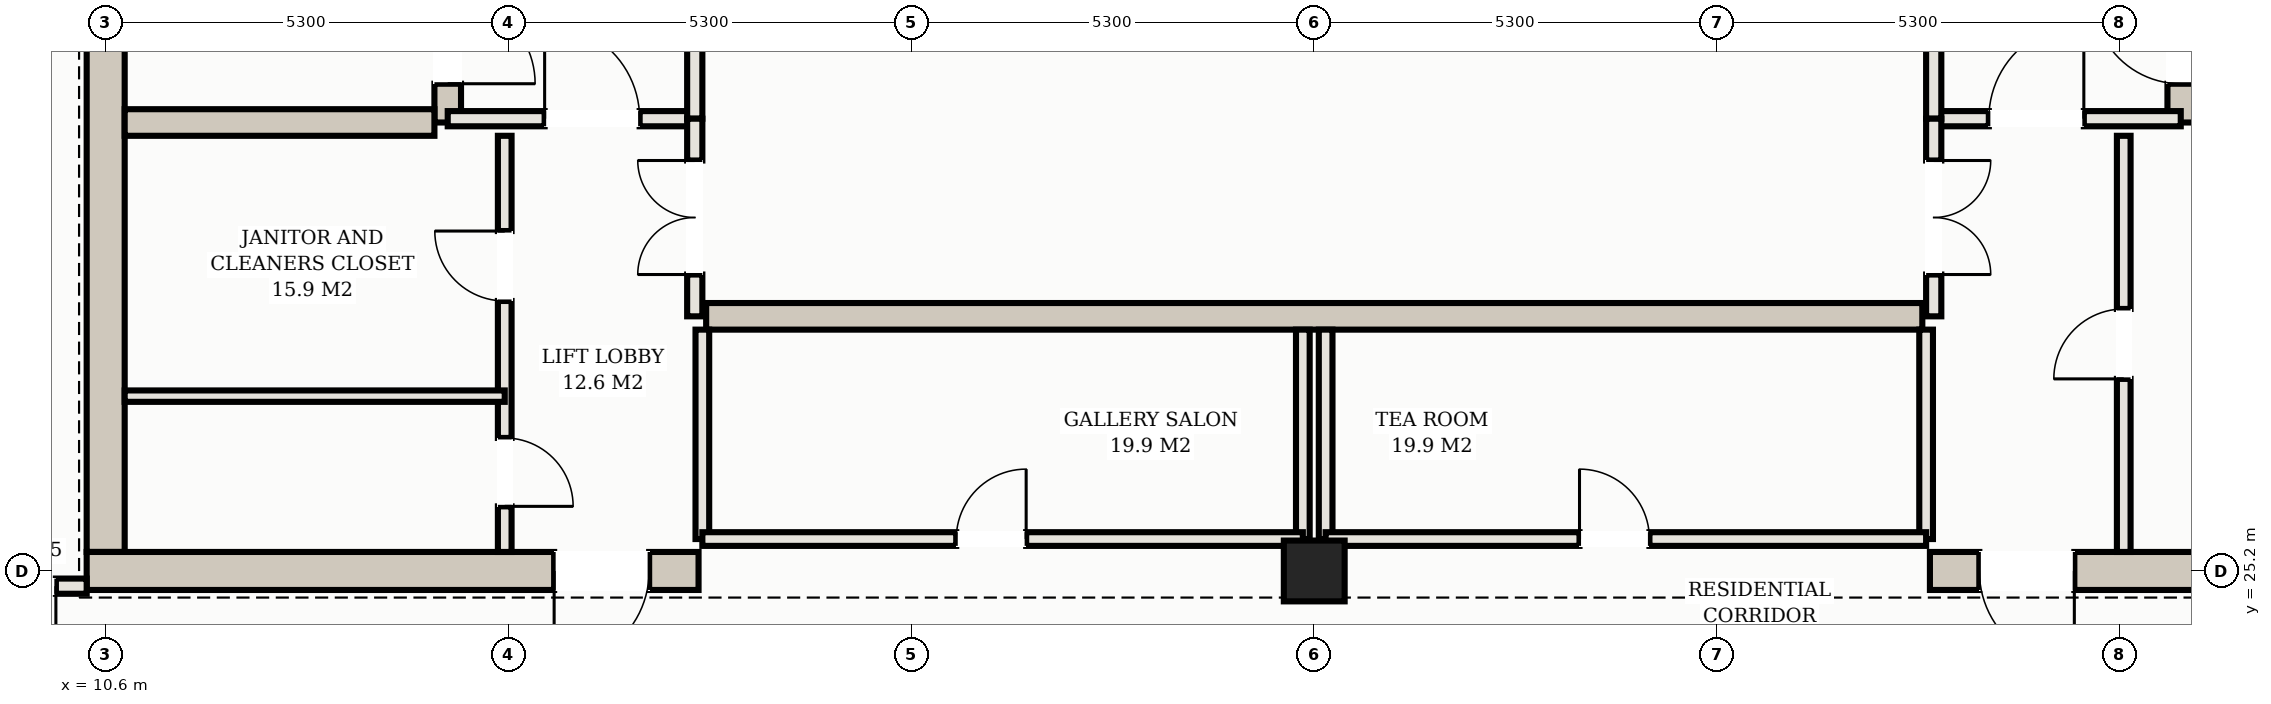
"""IFC4 building model, lengths in metres.
Left out: names, types, materials, properties, quantities, classifications, styles, units other than length and angle.
Written with IfcOpenShell. Run it as: python <this file> out.ifc"""

import sys

from ifc_helpers import new_model, si_unit, direction, frame, frame_2d, origin, origin_2d, place, context, subcontext, project, spatial, rectangle, hollow_rectangle, extrude, element, fill, save


model = new_model("IFC4")
c1 = context("Model", 3, precision=1e-05, world=origin(), true_north=direction((0.0, 1.0)))
c2 = subcontext(c1, "Body", "Model", "MODEL_VIEW")
j1 = project(units=[si_unit("LENGTHUNIT", "METRE"), si_unit("PLANEANGLEUNIT", "RADIAN")], contexts=[c1])
p1 = place(None, origin())
s1 = spatial("IfcSite", under=j1, at=p1, CompositionType="ELEMENT")
p2 = place(p1, origin())
s2 = spatial("IfcBuilding", under=s1, at=p2, CompositionType="ELEMENT")
p3 = place(p2, frame((0.0, 0.0, 213.2)))
s3 = spatial("IfcBuildingStorey", under=s2, at=p3, CompositionType="ELEMENT", Elevation=213.2)
p4 = place(p3, frame((10.6, 25.45, 0.0), z_axis=(0.0, 0.0, 1.0), x_axis=(0.0, 1.0, 0.0)))
e1 = element("IfcWall", 1, at=p4, inside=s3, PredefinedType="SHEAR", context=c2, shape_type="SweptSolid", body=[
    extrude(rectangle(XDim=14.3, YDim=0.5, at=frame_2d((7.15, 0.0))), origin(), (0.0, 0.0, 1.0), 3.11),
])
p5 = place(p3, frame((10.35, 25.2, 0.0), z_axis=(0.0, 0.0, 1.0), x_axis=(1.0, 0.0, 0.0)))
e2 = element("IfcWall", 2, at=p5, inside=s3, PredefinedType="SHEAR", context=c2, shape_type="SweptSolid", body=[
    extrude(rectangle(XDim=8.05, YDim=0.5, at=frame_2d((4.025, 0.0))), origin(), (0.0, 0.0, 1.0), 3.11),
])
p6 = place(p5, frame((6.15, 0.0, 0.0)))
e3 = element("IfcOpeningElement", 3, at=p6, cuts=e2, PredefinedType="OPENING", context=c2, shape_type="SweptSolid", body=[
    extrude(rectangle(XDim=1.25, YDim=2.2, at=frame_2d((0.625, 1.1))), frame((0.0, 0.26, 0.0), z_axis=(0.0, -1.0, 0.0), x_axis=(1.0, 0.0, 0.0)), (0.0, 0.0, 1.0), 0.52),
])
p7 = place(p3, frame((34.6, 25.2, 0.0), z_axis=(0.0, 0.0, 1.0), x_axis=(1.0, 0.0, 0.0)))
e4 = element("IfcWall", 4, at=p7, inside=s3, PredefinedType="SHEAR", context=c2, shape_type="SweptSolid", body=[
    extrude(rectangle(XDim=8.05, YDim=0.5, at=frame_2d((4.025, 0.0))), origin(), (0.0, 0.0, 1.0), 3.11),
])
p8 = place(p7, frame((0.65, 0.0, 0.0)))
e5 = element("IfcOpeningElement", 5, at=p8, cuts=e4, PredefinedType="OPENING", context=c2, shape_type="SweptSolid", body=[
    extrude(rectangle(XDim=1.25, YDim=2.2, at=frame_2d((0.625, 1.1))), frame((0.0, 0.26, 0.0), z_axis=(0.0, -1.0, 0.0), x_axis=(1.0, 0.0, 0.0)), (0.0, 0.0, 1.0), 0.52),
])
p9 = place(p3, frame((15.1, 31.1, 0.0), z_axis=(0.0, 0.0, 1.0), x_axis=(0.0, 1.0, 0.0)))
e6 = element("IfcWall", 6, at=p9, inside=s3, PredefinedType="SHEAR", context=c2, shape_type="SweptSolid", body=[
    extrude(rectangle(XDim=8.65, YDim=0.35, at=frame_2d((4.325, 0.0))), origin(), (0.0, 0.0, 1.0), 3.11),
])
p10 = place(p9, frame((0.51, 0.0, 0.0)))
e7 = element("IfcOpeningElement", 7, at=p10, cuts=e6, PredefinedType="OPENING", context=c2, shape_type="SweptSolid", body=[
    extrude(rectangle(XDim=1.15, YDim=2.2, at=frame_2d((0.575, 1.1))), frame((0.0, 0.185, 0.0), z_axis=(0.0, -1.0, 0.0), x_axis=(1.0, 0.0, 0.0)), (0.0, 0.0, 1.0), 0.37),
])
p11 = place(p3, frame((10.85, 31.1, 0.0), z_axis=(0.0, 0.0, 1.0), x_axis=(1.0, 0.0, 0.0)))
e8 = element("IfcWall", 8, at=p11, inside=s3, PredefinedType="SHEAR", context=c2, shape_type="SweptSolid", body=[
    extrude(rectangle(XDim=4.075, YDim=0.35, at=frame_2d((2.038, 0.0))), origin(), (0.0, 0.0, 1.0), 3.11),
])
p12 = place(p3, frame((37.9, 31.1, 0.0), z_axis=(0.0, 0.0, 1.0), x_axis=(0.0, 1.0, 0.0)))
e9 = element("IfcWall", 9, at=p12, inside=s3, PredefinedType="SHEAR", context=c2, shape_type="SweptSolid", body=[
    extrude(rectangle(XDim=8.65, YDim=0.35, at=frame_2d((4.325, 0.0))), origin(), (0.0, 0.0, 1.0), 3.11),
])
p13 = place(p12, frame((0.51, 0.0, 0.0)))
e10 = element("IfcOpeningElement", 10, at=p13, cuts=e9, PredefinedType="OPENING", context=c2, shape_type="SweptSolid", body=[
    extrude(rectangle(XDim=1.15, YDim=2.2, at=frame_2d((0.575, 1.1))), frame((0.0, 0.185, 0.0), z_axis=(0.0, -1.0, 0.0), x_axis=(1.0, 0.0, 0.0)), (0.0, 0.0, 1.0), 0.37),
])
p14 = place(p3, frame((18.5, 28.55, 0.0), z_axis=(0.0, 0.0, 1.0), x_axis=(1.0, 0.0, 0.0)))
e11 = element("IfcWall", 11, at=p14, inside=s3, PredefinedType="SHEAR", context=c2, shape_type="SweptSolid", body=[
    extrude(rectangle(XDim=16.0, YDim=0.35, at=frame_2d((8.0, 0.0))), origin(), (0.0, 0.0, 1.0), 3.11),
])
p15 = place(p3, frame((26.5, 25.2, 0.0), z_axis=(0.0, 0.0, 1.0), x_axis=(1.0, 0.0, 0.0)))
e12 = element("IfcColumn", 12, at=p15, inside=s3, PredefinedType="COLUMN", context=c2, shape_type="SweptSolid", body=[
    extrude(hollow_rectangle(XDim=0.8, YDim=0.8, WallThickness=0.028, at=origin_2d()), origin(), (0.0, 0.0, 1.0), 3.3),
])
p16 = place(p3, frame((15.1, 31.15, 0.0), z_axis=(0.0, 0.0, 1.0), x_axis=(1.0, 0.0, 0.0)))
e13 = element("IfcWall", 13, at=p16, inside=s3, PredefinedType="PARTITIONING", context=c2, shape_type="SweptSolid", body=[
    extrude(rectangle(XDim=3.25, YDim=0.2, at=frame_2d((1.625, 0.0))), origin(), (0.0, 0.0, 1.0), 2.43),
])
p17 = place(p16, frame((1.275, 0.0, 0.0)))
e14 = element("IfcOpeningElement", 14, at=p17, cuts=e13, PredefinedType="OPENING", context=c2, shape_type="SweptSolid", body=[
    extrude(rectangle(XDim=1.25, YDim=2.2, at=frame_2d((0.625, 1.1))), frame((0.0, 0.11, 0.0), z_axis=(0.0, -1.0, 0.0), x_axis=(1.0, 0.0, 0.0)), (0.0, 0.0, 1.0), 0.22),
])
p18 = place(p3, frame((18.35, 31.15, 0.0), z_axis=(0.0, 0.0, 1.0), x_axis=(0.0, 1.0, 0.0)))
e15 = element("IfcWall", 15, at=p18, inside=s3, PredefinedType="PARTITIONING", context=c2, shape_type="SweptSolid", body=[
    extrude(rectangle(XDim=5.15, YDim=0.2, at=frame_2d((2.575, 0.0))), origin(), (0.0, 0.0, 1.0), 2.43),
])
p19 = place(p18, frame((1.875, 0.0, 0.0)))
e16 = element("IfcOpeningElement", 16, at=p19, cuts=e15, PredefinedType="OPENING", context=c2, shape_type="SweptSolid", body=[
    extrude(rectangle(XDim=1.25, YDim=2.2, at=frame_2d((0.625, 1.1))), frame((0.0, 0.11, 0.0), z_axis=(0.0, -1.0, 0.0), x_axis=(1.0, 0.0, 0.0)), (0.0, 0.0, 1.0), 0.22),
])
p20 = place(p3, frame((34.65, 31.15, 0.0), z_axis=(0.0, 0.0, 1.0), x_axis=(1.0, 0.0, 0.0)))
e17 = element("IfcWall", 17, at=p20, inside=s3, PredefinedType="PARTITIONING", context=c2, shape_type="SweptSolid", body=[
    extrude(rectangle(XDim=3.25, YDim=0.2, at=frame_2d((1.625, 0.0))), origin(), (0.0, 0.0, 1.0), 2.43),
])
p21 = place(p20, frame((0.725, 0.0, 0.0)))
e18 = element("IfcOpeningElement", 18, at=p21, cuts=e17, PredefinedType="OPENING", context=c2, shape_type="SweptSolid", body=[
    extrude(rectangle(XDim=1.25, YDim=2.2, at=frame_2d((0.625, 1.1))), frame((0.0, 0.11, 0.0), z_axis=(0.0, -1.0, 0.0), x_axis=(1.0, 0.0, 0.0)), (0.0, 0.0, 1.0), 0.22),
])
p22 = place(p3, frame((34.65, 31.15, 0.0), z_axis=(0.0, 0.0, 1.0), x_axis=(0.0, 1.0, 0.0)))
e19 = element("IfcWall", 19, at=p22, inside=s3, PredefinedType="PARTITIONING", context=c2, shape_type="SweptSolid", body=[
    extrude(rectangle(XDim=5.15, YDim=0.2, at=frame_2d((2.575, 0.0))), origin(), (0.0, 0.0, 1.0), 2.43),
])
p23 = place(p22, frame((1.875, 0.0, 0.0)))
e20 = element("IfcOpeningElement", 20, at=p23, cuts=e19, PredefinedType="OPENING", context=c2, shape_type="SweptSolid", body=[
    extrude(rectangle(XDim=1.25, YDim=2.2, at=frame_2d((0.625, 1.1))), frame((0.0, 0.11, 0.0), z_axis=(0.0, -1.0, 0.0), x_axis=(1.0, 0.0, 0.0)), (0.0, 0.0, 1.0), 0.22),
])
p24 = place(p3, frame((15.85, 25.45, 0.0), z_axis=(0.0, 0.0, 1.0), x_axis=(0.0, 1.0, 0.0)))
e21 = element("IfcWall", 21, at=p24, inside=s3, PredefinedType="PARTITIONING", context=c2, shape_type="SweptSolid", body=[
    extrude(rectangle(XDim=5.475, YDim=0.18, at=frame_2d((2.738, 0.0))), origin(), (0.0, 0.0, 1.0), 2.43),
])
p25 = place(p24, frame((0.6, 0.0, 0.0)))
e22 = element("IfcOpeningElement", 22, at=p25, cuts=e21, PredefinedType="OPENING", context=c2, shape_type="SweptSolid", body=[
    extrude(rectangle(XDim=0.9, YDim=2.15, at=frame_2d((0.45, 1.075))), frame((0.0, 0.1, 0.0), z_axis=(0.0, -1.0, 0.0), x_axis=(1.0, 0.0, 0.0)), (0.0, 0.0, 1.0), 0.2),
])
p26 = place(p24, frame((3.302, 0.0, 0.0)))
e23 = element("IfcOpeningElement", 23, at=p26, cuts=e21, PredefinedType="OPENING", context=c2, shape_type="SweptSolid", body=[
    extrude(rectangle(XDim=0.92, YDim=2.15, at=frame_2d((0.46, 1.075))), frame((0.0, 0.1, 0.0), z_axis=(0.0, -1.0, 0.0), x_axis=(1.0, 0.0, 0.0)), (0.0, 0.0, 1.0), 0.2),
])
p27 = place(p3, frame((37.15, 25.45, 0.0), z_axis=(0.0, 0.0, 1.0), x_axis=(0.0, 1.0, 0.0)))
e24 = element("IfcWall", 24, at=p27, inside=s3, PredefinedType="PARTITIONING", context=c2, shape_type="SweptSolid", body=[
    extrude(rectangle(XDim=5.475, YDim=0.18, at=frame_2d((2.738, 0.0))), origin(), (0.0, 0.0, 1.0), 2.43),
])
p28 = place(p27, frame((2.277, 0.0, 0.0)))
e25 = element("IfcOpeningElement", 25, at=p28, cuts=e24, PredefinedType="OPENING", context=c2, shape_type="SweptSolid", body=[
    extrude(rectangle(XDim=0.92, YDim=2.15, at=frame_2d((0.46, 1.075))), frame((0.0, 0.1, 0.0), z_axis=(0.0, -1.0, 0.0), x_axis=(1.0, 0.0, 0.0)), (0.0, 0.0, 1.0), 0.2),
])
p29 = place(p3, frame((10.85, 27.5, 0.0), z_axis=(0.0, 0.0, 1.0), x_axis=(1.0, 0.0, 0.0)))
e26 = element("IfcWall", 26, at=p29, inside=s3, PredefinedType="PARTITIONING", context=c2, shape_type="SweptSolid", body=[
    extrude(rectangle(XDim=5.0, YDim=0.15, at=frame_2d((2.5, 0.0))), origin(), (0.0, 0.0, 1.0), 2.43),
])
p30 = place(p3, frame((18.35, 28.55, 0.0), z_axis=(0.0, 0.0, 1.0), x_axis=(0.0, 1.0, 0.0)))
e27 = element("IfcWall", 27, at=p30, inside=s3, PredefinedType="PARTITIONING", context=c2, shape_type="SweptSolid", body=[
    extrude(rectangle(XDim=2.6, YDim=0.2, at=frame_2d((1.3, 0.0))), origin(), (0.0, 0.0, 1.0), 2.43),
])
p31 = place(p30, frame((0.55, 0.0, 0.0)))
e28 = element("IfcOpeningElement", 28, at=p31, cuts=e27, PredefinedType="OPENING", context=c2, shape_type="SweptSolid", body=[
    extrude(rectangle(XDim=1.5, YDim=2.25, at=frame_2d((0.75, 1.125))), frame((0.0, 0.11, 0.0), z_axis=(0.0, -1.0, 0.0), x_axis=(1.0, 0.0, 0.0)), (0.0, 0.0, 1.0), 0.22),
])
p32 = place(p3, frame((34.65, 28.55, 0.0), z_axis=(0.0, 0.0, 1.0), x_axis=(0.0, 1.0, 0.0)))
e29 = element("IfcWall", 29, at=p32, inside=s3, PredefinedType="PARTITIONING", context=c2, shape_type="SweptSolid", body=[
    extrude(rectangle(XDim=2.6, YDim=0.2, at=frame_2d((1.3, 0.0))), origin(), (0.0, 0.0, 1.0), 2.43),
])
p33 = place(p32, frame((0.55, 0.0, 0.0)))
e30 = element("IfcOpeningElement", 30, at=p33, cuts=e29, PredefinedType="OPENING", context=c2, shape_type="SweptSolid", body=[
    extrude(rectangle(XDim=1.5, YDim=2.25, at=frame_2d((0.75, 1.125))), frame((0.0, 0.11, 0.0), z_axis=(0.0, -1.0, 0.0), x_axis=(1.0, 0.0, 0.0)), (0.0, 0.0, 1.0), 0.22),
])
for number, where, z_axis, x_axis in (
    (31, (18.45, 25.62, 0.0), (0.0, 0.0, 1.0), (0.0, 1.0, 0.0)),
    (32, (26.35, 25.62, 0.0), (0.0, 0.0, 1.0), (0.0, 1.0, 0.0)),
):
    element("IfcWall", number, at=place(p3, frame(where, z_axis=z_axis, x_axis=x_axis)), inside=s3, PredefinedType="PARTITIONING", context=c2, shape_type="SweptSolid", body=[
        extrude(rectangle(XDim=2.755, YDim=0.18, at=frame_2d((1.377, 0.0))), origin(), (0.0, 0.0, 1.0), 2.43),
    ])
p34 = place(p3, frame((18.45, 25.62, 0.0), z_axis=(0.0, 0.0, 1.0), x_axis=(1.0, 0.0, 0.0)))
e33 = element("IfcWall", 33, at=p34, inside=s3, PredefinedType="PARTITIONING", context=c2, shape_type="SweptSolid", body=[
    extrude(rectangle(XDim=7.9, YDim=0.18, at=frame_2d((3.95, 0.0))), origin(), (0.0, 0.0, 1.0), 2.43),
])
p35 = place(p34, frame((3.34, 0.0, 0.0)))
e34 = element("IfcOpeningElement", 34, at=p35, cuts=e33, PredefinedType="OPENING", context=c2, shape_type="SweptSolid", body=[
    extrude(rectangle(XDim=0.92, YDim=2.15, at=frame_2d((0.46, 1.075))), frame((0.0, 0.1, 0.0), z_axis=(0.0, -1.0, 0.0), x_axis=(1.0, 0.0, 0.0)), (0.0, 0.0, 1.0), 0.2),
])
for number, where, z_axis, x_axis in (
    (35, (26.65, 25.62, 0.0), (0.0, 0.0, 1.0), (0.0, 1.0, 0.0)),
    (36, (34.55, 25.62, 0.0), (0.0, 0.0, 1.0), (0.0, 1.0, 0.0)),
):
    element("IfcWall", number, at=place(p3, frame(where, z_axis=z_axis, x_axis=x_axis)), inside=s3, PredefinedType="PARTITIONING", context=c2, shape_type="SweptSolid", body=[
        extrude(rectangle(XDim=2.755, YDim=0.18, at=frame_2d((1.377, 0.0))), origin(), (0.0, 0.0, 1.0), 2.43),
    ])
p36 = place(p3, frame((26.65, 25.62, 0.0), z_axis=(0.0, 0.0, 1.0), x_axis=(1.0, 0.0, 0.0)))
e37 = element("IfcWall", 37, at=p36, inside=s3, PredefinedType="PARTITIONING", context=c2, shape_type="SweptSolid", body=[
    extrude(rectangle(XDim=7.9, YDim=0.18, at=frame_2d((3.95, 0.0))), origin(), (0.0, 0.0, 1.0), 2.43),
])
p37 = place(p36, frame((3.34, 0.0, 0.0)))
e38 = element("IfcOpeningElement", 38, at=p37, cuts=e37, PredefinedType="OPENING", context=c2, shape_type="SweptSolid", body=[
    extrude(rectangle(XDim=0.92, YDim=2.15, at=frame_2d((0.46, 1.075))), frame((0.0, 0.1, 0.0), z_axis=(0.0, -1.0, 0.0), x_axis=(1.0, 0.0, 0.0)), (0.0, 0.0, 1.0), 0.2),
])
p38 = place(p3, frame((6.72, 25.0, 0.0), z_axis=(0.0, 0.0, 1.0), x_axis=(1.0, 0.0, 0.0)))
e39 = element("IfcWall", 39, at=p38, inside=s3, PredefinedType="PARTITIONING", context=c2, shape_type="SweptSolid", body=[
    extrude(rectangle(XDim=3.63, YDim=0.2, at=frame_2d((1.815, 0.0))), origin(), (0.0, 0.0, 1.0), 2.43),
])
p39 = place(p38, frame((2.305, 0.0, 0.0)))
e40 = element("IfcOpeningElement", 40, at=p39, cuts=e39, PredefinedType="OPENING", context=c2, shape_type="SweptSolid", body=[
    extrude(rectangle(XDim=0.92, YDim=2.15, at=frame_2d((0.46, 1.075))), frame((0.0, 0.11, 0.0), z_axis=(0.0, -1.0, 0.0), x_axis=(1.0, 0.0, 0.0)), (0.0, 0.0, 1.0), 0.22),
])
p40 = place(p6, frame((1.25, 0.0, 0.0), z_axis=(0.0, 0.0, 1.0), x_axis=(-1.0, 0.0, 0.0)))
e41 = element("IfcDoor", 41, at=p40, inside=s3, OperationType="SINGLE_SWING_RIGHT", PredefinedType="DOOR", context=c2, shape_type="SweptSolid", body=[
    extrude(rectangle(XDim=1.25, YDim=2.2, at=frame_2d((0.625, 1.1))), frame((0.0, 0.025, 0.0), z_axis=(0.0, -1.0, 0.0), x_axis=(1.0, 0.0, 0.0)), (0.0, 0.0, 1.0), 0.05),
])
fill(e3, e41)
p41 = place(p8, frame((1.25, 0.0, 0.0), z_axis=(0.0, 0.0, 1.0), x_axis=(-1.0, 0.0, 0.0)))
e42 = element("IfcDoor", 42, at=p41, inside=s3, OperationType="SINGLE_SWING_LEFT", PredefinedType="DOOR", context=c2, shape_type="SweptSolid", body=[
    extrude(rectangle(XDim=1.25, YDim=2.2, at=frame_2d((0.625, 1.1))), frame((0.0, 0.025, 0.0), z_axis=(0.0, -1.0, 0.0), x_axis=(1.0, 0.0, 0.0)), (0.0, 0.0, 1.0), 0.05),
])
fill(e5, e42)
p42 = place(p17, origin())
e43 = element("IfcDoor", 43, at=p42, inside=s3, OperationType="SINGLE_SWING_LEFT", PredefinedType="DOOR", context=c2, shape_type="SweptSolid", body=[
    extrude(rectangle(XDim=1.25, YDim=2.2, at=frame_2d((0.625, 1.1))), frame((0.0, 0.025, 0.0), z_axis=(0.0, -1.0, 0.0), x_axis=(1.0, 0.0, 0.0)), (0.0, 0.0, 1.0), 0.05),
])
fill(e14, e43)
p43 = place(p21, origin())
e44 = element("IfcDoor", 44, at=p43, inside=s3, OperationType="SINGLE_SWING_RIGHT", PredefinedType="DOOR", context=c2, shape_type="SweptSolid", body=[
    extrude(rectangle(XDim=1.25, YDim=2.2, at=frame_2d((0.625, 1.1))), frame((0.0, 0.025, 0.0), z_axis=(0.0, -1.0, 0.0), x_axis=(1.0, 0.0, 0.0)), (0.0, 0.0, 1.0), 0.05),
])
fill(e18, e44)
p44 = place(p10, frame((1.15, 0.0, 0.0), z_axis=(0.0, 0.0, 1.0), x_axis=(-1.0, 0.0, 0.0)))
e45 = element("IfcDoor", 45, at=p44, inside=s3, OperationType="SINGLE_SWING_RIGHT", PredefinedType="DOOR", context=c2, shape_type="SweptSolid", body=[
    extrude(rectangle(XDim=1.15, YDim=2.2, at=frame_2d((0.575, 1.1))), frame((0.0, 0.025, 0.0), z_axis=(0.0, -1.0, 0.0), x_axis=(1.0, 0.0, 0.0)), (0.0, 0.0, 1.0), 0.05),
])
fill(e7, e45)
p45 = place(p13, origin())
e46 = element("IfcDoor", 46, at=p45, inside=s3, OperationType="SINGLE_SWING_RIGHT", PredefinedType="DOOR", context=c2, shape_type="SweptSolid", body=[
    extrude(rectangle(XDim=1.15, YDim=2.2, at=frame_2d((0.575, 1.1))), frame((0.0, 0.025, 0.0), z_axis=(0.0, -1.0, 0.0), x_axis=(1.0, 0.0, 0.0)), (0.0, 0.0, 1.0), 0.05),
])
fill(e10, e46)
p46 = place(p25, frame((0.9, 0.0, 0.0), z_axis=(0.0, 0.0, 1.0), x_axis=(-1.0, 0.0, 0.0)))
e47 = element("IfcDoor", 47, at=p46, inside=s3, OperationType="SINGLE_SWING_RIGHT", PredefinedType="DOOR", context=c2, shape_type="SweptSolid", body=[
    extrude(rectangle(XDim=0.9, YDim=2.15, at=frame_2d((0.45, 1.075))), frame((0.0, 0.025, 0.0), z_axis=(0.0, -1.0, 0.0), x_axis=(1.0, 0.0, 0.0)), (0.0, 0.0, 1.0), 0.05),
])
fill(e22, e47)
p47 = place(p26, origin())
e48 = element("IfcDoor", 48, at=p47, inside=s3, OperationType="SINGLE_SWING_RIGHT", PredefinedType="DOOR", context=c2, shape_type="SweptSolid", body=[
    extrude(rectangle(XDim=0.92, YDim=2.15, at=frame_2d((0.46, 1.075))), frame((0.0, 0.025, 0.0), z_axis=(0.0, -1.0, 0.0), x_axis=(1.0, 0.0, 0.0)), (0.0, 0.0, 1.0), 0.05),
])
fill(e23, e48)
p48 = place(p28, origin())
e49 = element("IfcDoor", 49, at=p48, inside=s3, OperationType="SINGLE_SWING_LEFT", PredefinedType="DOOR", context=c2, shape_type="SweptSolid", body=[
    extrude(rectangle(XDim=0.92, YDim=2.15, at=frame_2d((0.46, 1.075))), frame((0.0, 0.025, 0.0), z_axis=(0.0, -1.0, 0.0), x_axis=(1.0, 0.0, 0.0)), (0.0, 0.0, 1.0), 0.05),
])
fill(e25, e49)
p49 = place(p31, origin())
e50 = element("IfcDoor", 50, at=p49, inside=s3, OperationType="DOUBLE_DOOR_SINGLE_SWING", PredefinedType="DOOR", context=c2, shape_type="SweptSolid", body=[
    extrude(rectangle(XDim=1.5, YDim=2.25, at=frame_2d((0.75, 1.125))), frame((0.0, 0.025, 0.0), z_axis=(0.0, -1.0, 0.0), x_axis=(1.0, 0.0, 0.0)), (0.0, 0.0, 1.0), 0.05),
])
fill(e28, e50)
p50 = place(p33, frame((1.5, 0.0, 0.0), z_axis=(0.0, 0.0, 1.0), x_axis=(-1.0, 0.0, 0.0)))
e51 = element("IfcDoor", 51, at=p50, inside=s3, OperationType="DOUBLE_DOOR_SINGLE_SWING", PredefinedType="DOOR", context=c2, shape_type="SweptSolid", body=[
    extrude(rectangle(XDim=1.5, YDim=2.25, at=frame_2d((0.75, 1.125))), frame((0.0, 0.025, 0.0), z_axis=(0.0, -1.0, 0.0), x_axis=(1.0, 0.0, 0.0)), (0.0, 0.0, 1.0), 0.05),
])
fill(e30, e51)
p51 = place(p35, origin())
e52 = element("IfcDoor", 52, at=p51, inside=s3, OperationType="SINGLE_SWING_RIGHT", PredefinedType="DOOR", context=c2, shape_type="SweptSolid", body=[
    extrude(rectangle(XDim=0.92, YDim=2.15, at=frame_2d((0.46, 1.075))), frame((0.0, 0.025, 0.0), z_axis=(0.0, -1.0, 0.0), x_axis=(1.0, 0.0, 0.0)), (0.0, 0.0, 1.0), 0.05),
])
fill(e34, e52)
p52 = place(p37, origin())
e53 = element("IfcDoor", 53, at=p52, inside=s3, OperationType="SINGLE_SWING_LEFT", PredefinedType="DOOR", context=c2, shape_type="SweptSolid", body=[
    extrude(rectangle(XDim=0.92, YDim=2.15, at=frame_2d((0.46, 1.075))), frame((0.0, 0.025, 0.0), z_axis=(0.0, -1.0, 0.0), x_axis=(1.0, 0.0, 0.0)), (0.0, 0.0, 1.0), 0.05),
])
fill(e38, e53)
p53 = place(p39, frame((0.92, 0.0, 0.0), z_axis=(0.0, 0.0, 1.0), x_axis=(-1.0, 0.0, 0.0)))
e54 = element("IfcDoor", 54, at=p53, inside=s3, OperationType="SINGLE_SWING_LEFT", PredefinedType="DOOR", context=c2, shape_type="SweptSolid", body=[
    extrude(rectangle(XDim=0.92, YDim=2.15, at=frame_2d((0.46, 1.075))), frame((0.0, 0.025, 0.0), z_axis=(0.0, -1.0, 0.0), x_axis=(1.0, 0.0, 0.0)), (0.0, 0.0, 1.0), 0.05),
])
fill(e40, e54)
save(model, sys.argv[1])
